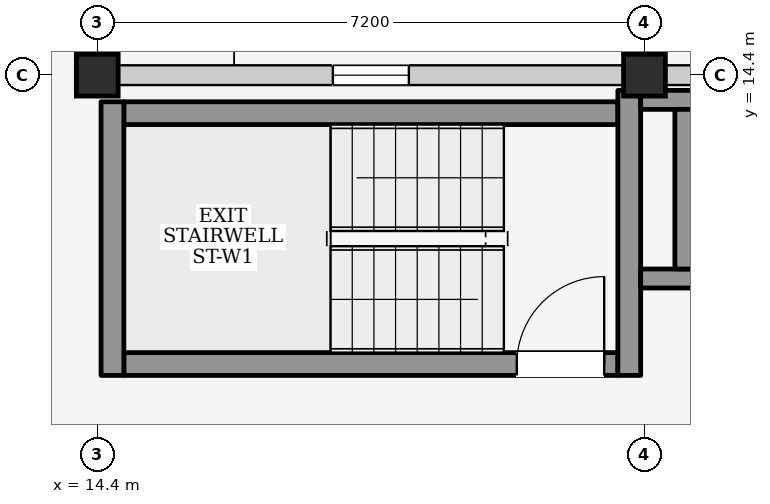
"""IFC4 building model, lengths in metres.
Left out: names, types, materials, properties, quantities, classifications, styles, units other than length and angle.
Written with IfcOpenShell. Run it as: python <this file> out.ifc"""

import sys

from ifc_helpers import new_model, si_unit, direction, frame, frame_2d, origin, origin_2d, place, context, subcontext, project, spatial, rectangle, extrude, element, fill, save


model = new_model("IFC4")
c1 = context("Model", 3, precision=1e-05, world=origin(), true_north=direction((0.0, 1.0)))
c2 = subcontext(c1, "Body", "Model", "MODEL_VIEW")
j1 = project(units=[si_unit("LENGTHUNIT", "METRE"), si_unit("PLANEANGLEUNIT", "RADIAN")], contexts=[c1])
p1 = place(None, origin())
s1 = spatial("IfcSite", under=j1, at=p1, CompositionType="ELEMENT")
p2 = place(p1, origin())
s2 = spatial("IfcBuilding", under=s1, at=p2, CompositionType="ELEMENT")
p3 = place(p2, frame((0.0, 0.0, 25.1)))
s3 = spatial("IfcBuildingStorey", under=s2, at=p3, CompositionType="ELEMENT", Elevation=25.1)
for number, where, z_axis, x_axis in (
    (1, (14.4, 14.4, 0.0), (0.0, 0.0, 1.0), (1.0, 0.0, 0.0)),
    (2, (21.6, 14.4, 0.0), (0.0, 0.0, 1.0), (1.0, 0.0, 0.0)),
):
    element("IfcColumn", number, at=place(p3, frame(where, z_axis=z_axis, x_axis=x_axis)), inside=s3, PredefinedType="COLUMN", context=c2, shape_type="SweptSolid", body=[
        extrude(rectangle(XDim=0.55, YDim=0.55, at=origin_2d()), origin(), (0.0, 0.0, 1.0), 3.2),
    ])
p4 = place(p3, frame((14.4, 14.675, 0.0), z_axis=(0.0, 0.0, 1.0), x_axis=(0.0, 1.0, 0.0)))
e3 = element("IfcWall", 3, at=p4, inside=s3, PredefinedType="ELEMENTEDWALL", context=c2, shape_type="SweptSolid", body=[
    extrude(rectangle(XDim=6.65, YDim=0.26, at=frame_2d((3.325, 0.0))), origin(), (0.0, 0.0, 1.0), 2.475),
])
p5 = place(p4, frame((2.5, 0.0, 0.0)))
e4 = element("IfcOpeningElement", 4, at=p5, cuts=e3, PredefinedType="OPENING", context=c2, shape_type="SweptSolid", body=[
    extrude(rectangle(XDim=1.4, YDim=2.1, at=frame_2d((0.7, 1.05))), frame((0.0, 0.145, 0.0), z_axis=(0.0, -1.0, 0.0), x_axis=(1.0, 0.0, 0.0)), (0.0, 0.0, 1.0), 0.29),
])
p6 = place(p3, frame((14.675, 14.4, 0.0), z_axis=(0.0, 0.0, 1.0), x_axis=(1.0, 0.0, 0.0)))
e5 = element("IfcWall", 5, at=p6, inside=s3, PredefinedType="ELEMENTEDWALL", context=c2, shape_type="SweptSolid", body=[
    extrude(rectangle(XDim=6.65, YDim=0.26, at=frame_2d((3.325, 0.0))), origin(), (0.0, 0.0, 1.0), 2.375),
])
p7 = place(p6, frame((2.825, 0.0, 1.2)))
e6 = element("IfcOpeningElement", 6, at=p7, cuts=e5, PredefinedType="OPENING", context=c2, shape_type="SweptSolid", body=[
    extrude(rectangle(XDim=1.0, YDim=0.9, at=frame_2d((0.5, 0.45))), frame((0.0, 0.145, 0.0), z_axis=(0.0, -1.0, 0.0), x_axis=(1.0, 0.0, 0.0)), (0.0, 0.0, 1.0), 0.29),
])
p8 = place(p3, frame((21.875, 14.4, 0.0), z_axis=(0.0, 0.0, 1.0), x_axis=(1.0, 0.0, 0.0)))
e7 = element("IfcWall", 7, at=p8, inside=s3, PredefinedType="ELEMENTEDWALL", context=c2, shape_type="SweptSolid", body=[
    extrude(rectangle(XDim=6.65, YDim=0.26, at=frame_2d((3.325, 0.0))), origin(), (0.0, 0.0, 1.0), 2.375),
])
p9 = place(p8, frame((2.825, 0.0, 1.2)))
e8 = element("IfcOpeningElement", 8, at=p9, cuts=e7, PredefinedType="OPENING", context=c2, shape_type="SweptSolid", body=[
    extrude(rectangle(XDim=1.0, YDim=0.9, at=frame_2d((0.5, 0.45))), frame((0.0, 0.145, 0.0), z_axis=(0.0, -1.0, 0.0), x_axis=(1.0, 0.0, 0.0)), (0.0, 0.0, 1.0), 0.29),
])
p10 = place(p3, frame((14.75, 10.6, 0.0), z_axis=(0.0, 0.0, 1.0), x_axis=(1.0, 0.0, 0.0)))
e9 = element("IfcWall", 9, at=p10, inside=s3, PredefinedType="SHEAR", context=c2, shape_type="SweptSolid", body=[
    extrude(rectangle(XDim=6.5, YDim=0.3, at=frame_2d((3.25, 0.0))), origin(), (0.0, 0.0, 1.0), 2.99),
])
p11 = place(p10, frame((5.17, 0.0, 0.0)))
e10 = element("IfcOpeningElement", 10, at=p11, cuts=e9, PredefinedType="OPENING", context=c2, shape_type="SweptSolid", body=[
    extrude(rectangle(XDim=1.15, YDim=2.2, at=frame_2d((0.575, 1.1))), frame((0.0, 0.165, 0.0), z_axis=(0.0, -1.0, 0.0), x_axis=(1.0, 0.0, 0.0)), (0.0, 0.0, 1.0), 0.33),
])
p12 = place(p3, frame((14.75, 13.9, 0.0), z_axis=(0.0, 0.0, 1.0), x_axis=(1.0, 0.0, 0.0)))
e11 = element("IfcWall", 11, at=p12, inside=s3, PredefinedType="SHEAR", context=c2, shape_type="SweptSolid", body=[
    extrude(rectangle(XDim=6.5, YDim=0.3, at=frame_2d((3.25, 0.0))), origin(), (0.0, 0.0, 1.0), 2.99),
])
p13 = place(p3, frame((14.6, 10.45, 0.0), z_axis=(0.0, 0.0, 1.0), x_axis=(0.0, 1.0, 0.0)))
e12 = element("IfcWall", 12, at=p13, inside=s3, PredefinedType="SHEAR", context=c2, shape_type="SweptSolid", body=[
    extrude(rectangle(XDim=3.6, YDim=0.3, at=frame_2d((1.8, 0.0))), origin(), (0.0, 0.0, 1.0), 2.99),
])
p14 = place(p3, frame((21.4, 10.45, 0.0), z_axis=(0.0, 0.0, 1.0), x_axis=(0.0, 1.0, 0.0)))
e13 = element("IfcWall", 13, at=p14, inside=s3, PredefinedType="SHEAR", context=c2, shape_type="SweptSolid", body=[
    extrude(rectangle(XDim=3.75, YDim=0.3, at=frame_2d((1.875, 0.0))), origin(), (0.0, 0.0, 1.0), 2.99),
])
p15 = place(p3, frame((21.55, 11.725, 0.0), z_axis=(0.0, 0.0, 1.0), x_axis=(1.0, 0.0, 0.0)))
e14 = element("IfcWall", 14, at=p15, inside=s3, PredefinedType="SHEAR", context=c2, shape_type="SweptSolid", body=[
    extrude(rectangle(XDim=2.55, YDim=0.25, at=frame_2d((1.275, 0.0))), origin(), (0.0, 0.0, 1.0), 2.99),
])
p16 = place(p15, frame((0.95, 0.0, 0.0)))
e15 = element("IfcOpeningElement", 15, at=p16, cuts=e14, PredefinedType="OPENING", context=c2, shape_type="SweptSolid", body=[
    extrude(rectangle(XDim=1.1, YDim=2.15, at=frame_2d((0.55, 1.075))), frame((0.0, 0.14, 0.0), z_axis=(0.0, -1.0, 0.0), x_axis=(1.0, 0.0, 0.0)), (0.0, 0.0, 1.0), 0.28),
])
p17 = place(p3, frame((21.55, 14.075, 0.0), z_axis=(0.0, 0.0, 1.0), x_axis=(1.0, 0.0, 0.0)))
e16 = element("IfcWall", 16, at=p17, inside=s3, PredefinedType="SHEAR", context=c2, shape_type="SweptSolid", body=[
    extrude(rectangle(XDim=2.55, YDim=0.25, at=frame_2d((1.275, 0.0))), origin(), (0.0, 0.0, 1.0), 2.99),
])
p18 = place(p3, frame((22.125, 11.85, 0.0), z_axis=(0.0, 0.0, 1.0), x_axis=(0.0, 1.0, 0.0)))
e17 = element("IfcWall", 17, at=p18, inside=s3, PredefinedType="SHEAR", context=c2, shape_type="SweptSolid", body=[
    extrude(rectangle(XDim=2.1, YDim=0.25, at=frame_2d((1.05, 0.0))), origin(), (0.0, 0.0, 1.0), 2.99),
])
p19 = place(p7, origin())
e18 = element("IfcWindow", 18, at=p19, inside=s3, PartitioningType="SINGLE_PANEL", PredefinedType="WINDOW", context=c2, shape_type="SweptSolid", body=[
    extrude(rectangle(XDim=1.0, YDim=0.9, at=frame_2d((0.5, 0.45))), frame((0.0, 0.03, 0.0), z_axis=(0.0, -1.0, 0.0), x_axis=(1.0, 0.0, 0.0)), (0.0, 0.0, 1.0), 0.06),
])
fill(e6, e18)
p20 = place(p11, origin())
e19 = element("IfcDoor", 19, at=p20, inside=s3, OperationType="SINGLE_SWING_RIGHT", PredefinedType="DOOR", context=c2, shape_type="SweptSolid", body=[
    extrude(rectangle(XDim=1.15, YDim=2.2, at=frame_2d((0.575, 1.1))), frame((0.0, 0.025, 0.0), z_axis=(0.0, -1.0, 0.0), x_axis=(1.0, 0.0, 0.0)), (0.0, 0.0, 1.0), 0.05),
])
fill(e10, e19)
save(model, sys.argv[1])
